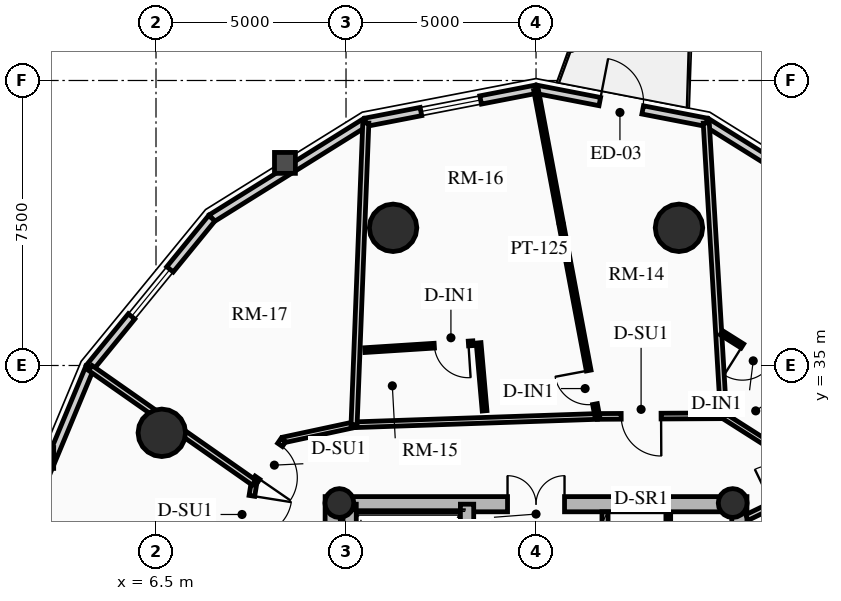
"""IFC4 building model, lengths in metres.
Left out: names, types, materials, properties, quantities, classifications, styles, units other than length and angle.
Written with IfcOpenShell. Run it as: python <this file> out.ifc"""

import sys

from ifc_helpers import new_model, si_unit, direction, frame, frame_2d, origin, origin_2d, place, context, subcontext, project, spatial, rectangle, circle, hollow_circle, extrude, source, transform, mapped, element, fill, save


model = new_model("IFC4")
c1 = context("Model", 3, precision=1e-05, world=origin(), true_north=direction((0.0, 1.0)))
c2 = subcontext(c1, "Body", "Model", "MODEL_VIEW")
j1 = project(units=[si_unit("LENGTHUNIT", "METRE"), si_unit("PLANEANGLEUNIT", "RADIAN")], contexts=[c1])
p1 = place(None, origin())
s1 = spatial("IfcSite", under=j1, at=p1, CompositionType="ELEMENT")
p2 = place(p1, origin())
s2 = spatial("IfcBuilding", under=s1, at=p2, CompositionType="ELEMENT")
p3 = place(p2, frame((0.0, 0.0, 154.51)))
s3 = spatial("IfcBuildingStorey", under=s2, at=p3, CompositionType="ELEMENT", Elevation=154.51)
for number, where, z_axis, x_axis in (
    (1, (11.15, 17.45, 0.0), (0.0, 0.0, 1.0), (0.0, 1.0, 0.0)),
    (2, (21.85, 17.45, 0.0), (0.0, 0.0, 1.0), (0.0, 1.0, 0.0)),
):
    element("IfcWall", number, at=place(p3, frame(where, z_axis=z_axis, x_axis=x_axis)), inside=s3, PredefinedType="SHEAR", context=c2, shape_type="SweptSolid", body=[
        extrude(rectangle(XDim=14.1, YDim=0.4, at=frame_2d((7.05, 0.0))), origin(), (0.0, 0.0, 1.0), 2.91),
    ])
p4 = place(p3, frame((11.15, 31.35, 0.0), z_axis=(0.0, 0.0, 1.0), x_axis=(1.0, 0.0, 0.0)))
e3 = element("IfcWall", 3, at=p4, inside=s3, PredefinedType="SHEAR", context=c2, shape_type="SweptSolid", body=[
    extrude(rectangle(XDim=10.7, YDim=0.4, at=frame_2d((5.35, 0.0))), origin(), (0.0, 0.0, 1.0), 2.91),
])
m1 = source(origin(), c2, "Body", "SweptSolid", [
    extrude(rectangle(XDim=1.5, YDim=2.02, at=frame_2d((0.75, 1.01))), frame((0.0, 0.21, 0.0), z_axis=(0.0, -1.0, 0.0), x_axis=(1.0, 0.0, 0.0)), (0.0, 0.0, 1.0), 0.42),
])
p5 = place(p4, frame((4.6, 0.0, 0.0)))
e4 = element("IfcOpeningElement", 4, at=p5, cuts=e3, PredefinedType="OPENING", context=c2, shape_type="MappedRepresentation", body=[
    mapped(m1, transform((0.0, 0.0, 0.0), x_axis=(1.0, 0.0, 0.0), y_axis=(0.0, 1.0, 0.0), z_axis=(0.0, 0.0, 1.0), scale=1.0)),
])
p6 = place(p3, frame((14.685, 17.65, 0.0), z_axis=(0.0, 0.0, 1.0), x_axis=(0.0, 1.0, 0.0)))
e5 = element("IfcWall", 5, at=p6, inside=s3, PredefinedType="SHEAR", context=c2, shape_type="SweptSolid", body=[
    extrude(rectangle(XDim=13.7, YDim=0.35, at=frame_2d((6.85, 0.0))), origin(), (0.0, 0.0, 1.0), 2.91),
])
m2 = source(origin(), c2, "Body", "SweptSolid", [
    extrude(rectangle(XDim=1.1, YDim=2.015, at=frame_2d((0.55, 1.007))), frame((0.0, 0.185, 0.0), z_axis=(0.0, -1.0, 0.0), x_axis=(1.0, 0.0, 0.0)), (0.0, 0.0, 1.0), 0.37),
])
p7 = place(p6, frame((4.85, 0.0, 0.0)))
e6 = element("IfcOpeningElement", 6, at=p7, cuts=e5, PredefinedType="OPENING", context=c2, shape_type="MappedRepresentation", body=[
    mapped(m2, transform((0.0, 0.0, 0.0), x_axis=(1.0, 0.0, 0.0), y_axis=(0.0, 1.0, 0.0), z_axis=(0.0, 0.0, 1.0), scale=1.0)),
])
p8 = place(p6, frame((0.625, 0.0, 0.0)))
e7 = element("IfcOpeningElement", 7, at=p8, cuts=e5, PredefinedType="OPENING", context=c2, shape_type="MappedRepresentation", body=[
    mapped(m2, transform((0.0, 0.0, 0.0), x_axis=(1.0, 0.0, 0.0), y_axis=(0.0, 1.0, 0.0), z_axis=(0.0, 0.0, 1.0), scale=1.0)),
])
p9 = place(p6, frame((2.625, 0.0, 0.0)))
e8 = element("IfcOpeningElement", 8, at=p9, cuts=e5, PredefinedType="OPENING", context=c2, shape_type="MappedRepresentation", body=[
    mapped(m2, transform((0.0, 0.0, 0.0), x_axis=(1.0, 0.0, 0.0), y_axis=(0.0, 1.0, 0.0), z_axis=(0.0, 0.0, 1.0), scale=1.0)),
])
m3 = source(origin(), c2, "Body", "SweptSolid", [
    extrude(rectangle(XDim=1.15, YDim=2.02, at=frame_2d((0.575, 1.01))), frame((0.0, 0.185, 0.0), z_axis=(0.0, -1.0, 0.0), x_axis=(1.0, 0.0, 0.0)), (0.0, 0.0, 1.0), 0.37),
])
p10 = place(p6, frame((7.27, 0.0, 0.0)))
e9 = element("IfcOpeningElement", 9, at=p10, cuts=e5, PredefinedType="OPENING", context=c2, shape_type="MappedRepresentation", body=[
    mapped(m3, transform((0.0, 0.0, 0.0), x_axis=(1.0, 0.0, 0.0), y_axis=(0.0, 1.0, 0.0), z_axis=(0.0, 0.0, 1.0), scale=1.0)),
])
p11 = place(p3, frame((11.595, 24.655, 0.0), z_axis=(0.0, 0.0, 1.0), x_axis=(0.0, 1.0, 0.0)))
e10 = element("IfcWall", 10, at=p11, inside=s3, PredefinedType="SHEAR", context=c2, shape_type="SweptSolid", body=[
    extrude(rectangle(XDim=6.695, YDim=0.35, at=frame_2d((3.348, 0.0))), origin(), (0.0, 0.0, 1.0), 2.91),
])
for number, where, z_axis, x_axis in (
    (11, (11.325, 31.38, 0.0), (0.0, 0.0, 1.0), (1.0, 0.0, 0.0)),
    (12, (21.675, 31.38, 0.0), (0.0, 0.0, 1.0), (1.0, 0.0, 0.0)),
):
    element("IfcColumn", number, at=place(p3, frame(where, z_axis=z_axis, x_axis=x_axis)), inside=s3, PredefinedType="COLUMN", context=c2, shape_type="SweptSolid", body=[
        extrude(hollow_circle(Radius=0.38, WallThickness=0.032, at=origin_2d()), origin(), (0.0, 0.0, 1.0), 2.91),
    ])
for number, where, z_axis, x_axis in (
    (13, (20.261, 38.623, 0.0), (0.0, 0.0, 1.0), (1.0, 0.0, 0.0)),
    (14, (12.739, 38.623, 0.0), (0.0, 0.0, 1.0), (1.0, 0.0, 0.0)),
    (15, (6.653, 33.229, 0.0), (0.0, 0.0, 1.0), (1.0, 0.0, 0.0)),
):
    element("IfcColumn", number, at=place(p3, frame(where, z_axis=z_axis, x_axis=x_axis)), inside=s3, PredefinedType="USERDEFINED", context=c2, shape_type="SweptSolid", body=[
        extrude(circle(Radius=0.625, at=origin_2d()), origin(), (0.0, 0.0, 1.0), 2.91),
    ])
p12 = place(p3, frame((20.985, 41.4, 0.0), z_axis=(0.0, 0.0, 1.0), x_axis=(0.848452391194, -0.529271707044, 0.0)))
e16 = element("IfcWall", 16, at=p12, inside=s3, PredefinedType="SOLIDWALL", context=c2, shape_type="SweptSolid", body=[
    extrude(rectangle(XDim=4.769, YDim=0.22, at=frame_2d((2.385, 0.0))), origin(), (0.0, 0.0, 1.0), 2.245),
])
p13 = place(p3, frame((16.5, 42.27, 0.0), z_axis=(0.0, 0.0, 1.0), x_axis=(0.981718699963, -0.190337579429, 0.0)))
e17 = element("IfcWall", 17, at=p13, inside=s3, PredefinedType="SOLIDWALL", context=c2, shape_type="SweptSolid", body=[
    extrude(rectangle(XDim=4.569, YDim=0.22, at=frame_2d((2.284, 0.0))), origin(), (0.0, 0.0, 1.0), 2.245),
])
m4 = source(origin(), c2, "Body", "SweptSolid", [
    extrude(rectangle(XDim=1.15, YDim=2.005, at=frame_2d((0.575, 1.002))), frame((0.0, 0.12, 0.0), z_axis=(0.0, -1.0, 0.0), x_axis=(1.0, 0.0, 0.0)), (0.0, 0.0, 1.0), 0.24),
])
p14 = place(p13, frame((1.709, 0.0, 0.0)))
e18 = element("IfcOpeningElement", 18, at=p14, cuts=e17, PredefinedType="OPENING", context=c2, shape_type="MappedRepresentation", body=[
    mapped(m4, transform((0.0, 0.0, 0.0), x_axis=(1.0, 0.0, 0.0), y_axis=(0.0, 1.0, 0.0), z_axis=(0.0, 0.0, 1.0), scale=1.0)),
])
p15 = place(p3, frame((12.015, 41.4, 0.0), z_axis=(0.0, 0.0, 1.0), x_axis=(0.981718699963, 0.190337579429, 0.0)))
e19 = element("IfcWall", 19, at=p15, inside=s3, PredefinedType="SOLIDWALL", context=c2, shape_type="SweptSolid", body=[
    extrude(rectangle(XDim=4.569, YDim=0.22, at=frame_2d((2.284, 0.0))), origin(), (0.0, 0.0, 1.0), 2.245),
])
m5 = source(origin(), c2, "Body", "SweptSolid", [
    extrude(rectangle(XDim=1.6, YDim=1.3, at=frame_2d((0.8, 0.65))), frame((0.0, 0.12, 0.0), z_axis=(0.0, -1.0, 0.0), x_axis=(1.0, 0.0, 0.0)), (0.0, 0.0, 1.0), 0.24),
])
p16 = place(p15, frame((1.484, 0.0, 0.65)))
e20 = element("IfcOpeningElement", 20, at=p16, cuts=e19, PredefinedType="OPENING", context=c2, shape_type="MappedRepresentation", body=[
    mapped(m5, transform((0.0, 0.0, 0.0), x_axis=(1.0, 0.0, 0.0), y_axis=(0.0, 1.0, 0.0), z_axis=(0.0, 0.0, 1.0), scale=1.0)),
])
p17 = place(p3, frame((7.968, 38.876, 0.0), z_axis=(0.0, 0.0, 1.0), x_axis=(0.848452391194, 0.529271707044, 0.0)))
e21 = element("IfcWall", 21, at=p17, inside=s3, PredefinedType="SOLIDWALL", context=c2, shape_type="SweptSolid", body=[
    extrude(rectangle(XDim=4.769, YDim=0.22, at=frame_2d((2.385, 0.0))), origin(), (0.0, 0.0, 1.0), 2.245),
])
p18 = place(p3, frame((4.757, 34.945, 0.0), z_axis=(0.0, 0.0, 1.0), x_axis=(0.632598524901, 0.774479894053, 0.0)))
e22 = element("IfcWall", 22, at=p18, inside=s3, PredefinedType="SOLIDWALL", context=c2, shape_type="SweptSolid", body=[
    extrude(rectangle(XDim=5.076, YDim=0.22, at=frame_2d((2.538, 0.0))), origin(), (0.0, 0.0, 1.0), 2.245),
])
p19 = place(p18, frame((1.738, 0.0, 0.65)))
e23 = element("IfcOpeningElement", 23, at=p19, cuts=e22, PredefinedType="OPENING", context=c2, shape_type="MappedRepresentation", body=[
    mapped(m5, transform((0.0, 0.0, 0.0), x_axis=(1.0, 0.0, 0.0), y_axis=(0.0, 1.0, 0.0), z_axis=(0.0, 0.0, 1.0), scale=1.0)),
])
p20 = place(p3, frame((2.695, 29.991, 0.0), z_axis=(0.0, 0.0, 1.0), x_axis=(0.384259959969, 0.923224936386, 0.0)))
e24 = element("IfcWall", 24, at=p20, inside=s3, PredefinedType="SOLIDWALL", context=c2, shape_type="SweptSolid", body=[
    extrude(rectangle(XDim=5.365, YDim=0.22, at=frame_2d((2.683, 0.0))), origin(), (0.0, 0.0, 1.0), 2.245),
])
p21 = place(p3, frame((18.315, 27.25, 0.0), z_axis=(0.0, 0.0, 1.0), x_axis=(0.0, 1.0, 0.0)))
e25 = element("IfcWall", 25, at=p21, inside=s3, PredefinedType="PARTITIONING", context=c2, shape_type="SweptSolid", body=[
    extrude(rectangle(XDim=3.9, YDim=0.16, at=frame_2d((1.95, 0.0))), origin(), (0.0, 0.0, 1.0), 2.675),
])
m6 = source(origin(), c2, "Body", "SweptSolid", [
    extrude(rectangle(XDim=0.9, YDim=2.005, at=frame_2d((0.45, 1.002))), frame((0.0, 0.09, 0.0), z_axis=(0.0, -1.0, 0.0), x_axis=(1.0, 0.0, 0.0)), (0.0, 0.0, 1.0), 0.18),
])
p22 = place(p21, frame((2.2, 0.0, 0.0)))
e26 = element("IfcOpeningElement", 26, at=p22, cuts=e25, PredefinedType="OPENING", context=c2, shape_type="MappedRepresentation", body=[
    mapped(m6, transform((0.0, 0.0, 0.0), x_axis=(1.0, 0.0, 0.0), y_axis=(0.0, 1.0, 0.0), z_axis=(0.0, 0.0, 1.0), scale=1.0)),
])
p23 = place(p3, frame((19.98, 27.3, 0.0), z_axis=(0.0, 0.0, 1.0), x_axis=(0.0, 1.0, 0.0)))
e27 = element("IfcWall", 27, at=p23, inside=s3, PredefinedType="PARTITIONING", context=c2, shape_type="SweptSolid", body=[
    extrude(rectangle(XDim=3.82, YDim=0.125, at=frame_2d((1.91, 0.0))), origin(), (0.0, 0.0, 1.0), 2.675),
])
m7 = source(origin(), c2, "Body", "SweptSolid", [
    extrude(rectangle(XDim=0.9, YDim=2.005, at=frame_2d((0.45, 1.002))), frame((0.0, 0.073, 0.0), z_axis=(0.0, -1.0, 0.0), x_axis=(1.0, 0.0, 0.0)), (0.0, 0.0, 1.0), 0.145),
])
p24 = place(p23, frame((1.45, 0.0, 0.0)))
e28 = element("IfcOpeningElement", 28, at=p24, cuts=e27, PredefinedType="OPENING", context=c2, shape_type="MappedRepresentation", body=[
    mapped(m7, transform((0.0, 0.0, 0.0), x_axis=(1.0, 0.0, 0.0), y_axis=(0.0, 1.0, 0.0), z_axis=(0.0, 0.0, 1.0), scale=1.0)),
])
p25 = place(p3, frame((22.756, 32.836, 0.0), z_axis=(0.0, 0.0, 1.0), x_axis=(-0.843828401801, 0.536613108593, 0.0)))
e29 = element("IfcWall", 29, at=p25, inside=s3, PredefinedType="PARTITIONING", context=c2, shape_type="SweptSolid", body=[
    extrude(rectangle(XDim=1.565, YDim=0.15, at=frame_2d((0.783, 0.0))), origin(), (0.0, 0.0, 1.0), 2.245),
])
p26 = place(p3, frame((21.435, 33.677, 0.0), z_axis=(0.0, 0.0, 1.0), x_axis=(-0.999986775557, -0.005142831114, 0.0)))
e30 = element("IfcWall", 30, at=p26, inside=s3, PredefinedType="PARTITIONING", context=c2, shape_type="SweptSolid", body=[
    extrude(rectangle(XDim=3.323, YDim=0.15, at=frame_2d((1.662, 0.0))), origin(), (0.0, 0.0, 1.0), 2.245),
])
m8 = source(origin(), c2, "Body", "SweptSolid", [
    extrude(rectangle(XDim=1.05, YDim=2.015, at=frame_2d((0.525, 1.007))), frame((0.0, 0.085, 0.0), z_axis=(0.0, -1.0, 0.0), x_axis=(1.0, 0.0, 0.0)), (0.0, 0.0, 1.0), 0.17),
])
p27 = place(p26, frame((1.645, 0.0, 0.0)))
e31 = element("IfcOpeningElement", 31, at=p27, cuts=e30, PredefinedType="OPENING", context=c2, shape_type="MappedRepresentation", body=[
    mapped(m8, transform((0.0, 0.0, 0.0), x_axis=(1.0, 0.0, 0.0), y_axis=(0.0, 1.0, 0.0), z_axis=(0.0, 0.0, 1.0), scale=1.0)),
])
p28 = place(p3, frame((18.112, 33.659, 0.0), z_axis=(0.0, 0.0, 1.0), x_axis=(-0.999413895918, -0.034232508622, 0.0)))
e32 = element("IfcWall", 32, at=p28, inside=s3, PredefinedType="PARTITIONING", context=c2, shape_type="SweptSolid", body=[
    extrude(rectangle(XDim=6.404, YDim=0.15, at=frame_2d((3.202, 0.0))), origin(), (0.0, 0.0, 1.0), 2.245),
])
p29 = place(p3, frame((11.712, 33.44, 0.0), z_axis=(0.0, 0.0, 1.0), x_axis=(-0.977753514213, -0.209757158265, 0.0)))
e33 = element("IfcWall", 33, at=p29, inside=s3, PredefinedType="PARTITIONING", context=c2, shape_type="SweptSolid", body=[
    extrude(rectangle(XDim=1.901, YDim=0.15, at=frame_2d((0.95, 0.0))), origin(), (0.0, 0.0, 1.0), 2.245),
])
p30 = place(p3, frame((9.853, 33.042, 0.0), z_axis=(0.0, 0.0, 1.0), x_axis=(-0.567189283521, -0.823587467522, 0.0)))
e34 = element("IfcWall", 34, at=p30, inside=s3, PredefinedType="PARTITIONING", context=c2, shape_type="SweptSolid", body=[
    extrude(rectangle(XDim=1.365, YDim=0.15, at=frame_2d((0.682, 0.0))), origin(), (0.0, 0.0, 1.0), 2.245),
])
p31 = place(p30, frame((0.157, 0.0, 0.0)))
e35 = element("IfcOpeningElement", 35, at=p31, cuts=e34, PredefinedType="OPENING", context=c2, shape_type="MappedRepresentation", body=[
    mapped(m8, transform((0.0, 0.0, 0.0), x_axis=(1.0, 0.0, 0.0), y_axis=(0.0, 1.0, 0.0), z_axis=(0.0, 0.0, 1.0), scale=1.0)),
])
p32 = place(p3, frame((9.079, 31.918, 0.0), z_axis=(0.0, 0.0, 1.0), x_axis=(-0.15742775293, -0.987530507178, 0.0)))
e36 = element("IfcWall", 36, at=p32, inside=s3, PredefinedType="PARTITIONING", context=c2, shape_type="SweptSolid", body=[
    extrude(rectangle(XDim=1.523, YDim=0.15, at=frame_2d((0.761, 0.0))), origin(), (0.0, 0.0, 1.0), 2.245),
])
p33 = place(p32, frame((0.353, 0.0, 0.0)))
e37 = element("IfcOpeningElement", 37, at=p33, cuts=e36, PredefinedType="OPENING", context=c2, shape_type="MappedRepresentation", body=[
    mapped(m8, transform((0.0, 0.0, 0.0), x_axis=(1.0, 0.0, 0.0), y_axis=(0.0, 1.0, 0.0), z_axis=(0.0, 0.0, 1.0), scale=1.0)),
])
p34 = place(p3, frame((21.435, 33.677, 0.0), z_axis=(0.0, 0.0, 1.0), x_axis=(-0.059087305226, 0.99825281886, 0.0)))
e38 = element("IfcWall", 38, at=p34, inside=s3, PredefinedType="PARTITIONING", context=c2, shape_type="SweptSolid", body=[
    extrude(rectangle(XDim=7.718, YDim=0.16, at=frame_2d((3.859, 0.0))), origin(), (0.0, 0.0, 1.0), 2.245),
])
p35 = place(p3, frame((11.712, 33.44, 0.0), z_axis=(0.0, 0.0, 1.0), x_axis=(0.038892064024, 0.999243417469, 0.0)))
e39 = element("IfcWall", 39, at=p35, inside=s3, PredefinedType="PARTITIONING", context=c2, shape_type="SweptSolid", body=[
    extrude(rectangle(XDim=7.947, YDim=0.16, at=frame_2d((3.974, 0.0))), origin(), (0.0, 0.0, 1.0), 2.245),
])
p36 = place(p3, frame((9.079, 31.918, 0.0), z_axis=(0.0, 0.0, 1.0), x_axis=(-0.819135909075, 0.573599479135, 0.0)))
e40 = element("IfcWall", 40, at=p36, inside=s3, PredefinedType="PARTITIONING", context=c2, shape_type="SweptSolid", body=[
    extrude(rectangle(XDim=5.257, YDim=0.16, at=frame_2d((2.628, 0.0))), origin(), (0.0, 0.0, 1.0), 2.245),
])
p37 = place(p3, frame((22.05, 31.0, 0.0), z_axis=(0.0, 0.0, 1.0), x_axis=(0.900241516545, 0.435390872537, 0.0)))
e41 = element("IfcWall", 41, at=p37, inside=s3, PredefinedType="PARTITIONING", context=c2, shape_type="SweptSolid", body=[
    extrude(rectangle(XDim=1.989, YDim=0.16, at=frame_2d((0.995, 0.0))), origin(), (0.0, 0.0, 1.0), 2.245),
])
m9 = source(origin(), c2, "Body", "SweptSolid", [
    extrude(rectangle(XDim=1.05, YDim=2.015, at=frame_2d((0.525, 1.007))), frame((0.0, 0.09, 0.0), z_axis=(0.0, -1.0, 0.0), x_axis=(1.0, 0.0, 0.0)), (0.0, 0.0, 1.0), 0.18),
])
p38 = place(p37, frame((0.739, 0.0, 0.0)))
e42 = element("IfcOpeningElement", 42, at=p38, cuts=e41, PredefinedType="OPENING", context=c2, shape_type="MappedRepresentation", body=[
    mapped(m9, transform((0.0, 0.0, 0.0), x_axis=(1.0, 0.0, 0.0), y_axis=(0.0, 1.0, 0.0), z_axis=(0.0, 0.0, 1.0), scale=1.0)),
])
p39 = place(p3, frame((23.064, 34.801, 0.0), z_axis=(0.0, 0.0, 1.0), x_axis=(-0.846418905871, 0.532517638942, 0.0)))
e43 = element("IfcWall", 43, at=p39, inside=s3, PredefinedType="PARTITIONING", context=c2, shape_type="SweptSolid", body=[
    extrude(rectangle(XDim=1.993, YDim=0.125, at=frame_2d((0.997, 0.0))), origin(), (0.0, 0.0, 1.0), 2.675),
])
p40 = place(p39, frame((0.44, 0.0, 0.0)))
e44 = element("IfcOpeningElement", 44, at=p40, cuts=e43, PredefinedType="OPENING", context=c2, shape_type="MappedRepresentation", body=[
    mapped(m7, transform((0.0, 0.0, 0.0), x_axis=(1.0, 0.0, 0.0), y_axis=(0.0, 1.0, 0.0), z_axis=(0.0, 0.0, 1.0), scale=1.0)),
])
p41 = place(p3, frame((18.112, 33.659, 0.0), z_axis=(0.0, 0.0, 1.0), x_axis=(-0.18446223694, 0.982839601941, 0.0)))
e45 = element("IfcWall", 45, at=p41, inside=s3, PredefinedType="PARTITIONING", context=c2, shape_type="SweptSolid", body=[
    extrude(rectangle(XDim=8.74, YDim=0.125, at=frame_2d((4.37, 0.0))), origin(), (0.0, 0.0, 1.0), 2.245),
])
p42 = place(p41, frame((0.33, 0.0, 0.0)))
e46 = element("IfcOpeningElement", 46, at=p42, cuts=e45, PredefinedType="OPENING", context=c2, shape_type="MappedRepresentation", body=[
    mapped(m7, transform((0.0, 0.0, 0.0), x_axis=(1.0, 0.0, 0.0), y_axis=(0.0, 1.0, 0.0), z_axis=(0.0, 0.0, 1.0), scale=1.0)),
])
p43 = place(p3, frame((15.146, 33.807, 0.0), z_axis=(0.0, 0.0, 1.0), x_axis=(-0.087433462003, 0.996170361797, 0.0)))
e47 = element("IfcWall", 47, at=p43, inside=s3, PredefinedType="PARTITIONING", context=c2, shape_type="SweptSolid", body=[
    extrude(rectangle(XDim=1.795, YDim=0.125, at=frame_2d((0.898, 0.0))), origin(), (0.0, 0.0, 1.0), 2.675),
])
p44 = place(p3, frame((14.841, 35.586, 0.0), z_axis=(0.0, 0.0, 1.0), x_axis=(-0.997963636416, -0.063785424599, 0.0)))
e48 = element("IfcWall", 48, at=p44, inside=s3, PredefinedType="PARTITIONING", context=c2, shape_type="SweptSolid", body=[
    extrude(rectangle(XDim=2.852, YDim=0.125, at=frame_2d((1.426, 0.0))), origin(), (0.0, 0.0, 1.0), 2.245),
])
p45 = place(p44, frame((0.12, 0.0, 0.0)))
e49 = element("IfcOpeningElement", 49, at=p45, cuts=e48, PredefinedType="OPENING", context=c2, shape_type="MappedRepresentation", body=[
    mapped(m7, transform((0.0, 0.0, 0.0), x_axis=(1.0, 0.0, 0.0), y_axis=(0.0, 1.0, 0.0), z_axis=(0.0, 0.0, 1.0), scale=1.0)),
])
m10 = source(origin(), c2, "Body", "SweptSolid", [
    extrude(rectangle(XDim=1.15, YDim=2.005, at=frame_2d((0.575, 1.002))), frame((0.0, 0.025, 0.0), z_axis=(0.0, -1.0, 0.0), x_axis=(1.0, 0.0, 0.0)), (0.0, 0.0, 1.0), 0.05),
])
p46 = place(p14, origin())
e50 = element("IfcDoor", 50, at=p46, inside=s3, OperationType="SINGLE_SWING_LEFT", PredefinedType="DOOR", context=c2, shape_type="MappedRepresentation", body=[
    mapped(m10, transform((0.0, 0.0, 0.0), x_axis=(1.0, 0.0, 0.0), y_axis=(0.0, 1.0, 0.0), z_axis=(0.0, 0.0, 1.0), scale=1.0)),
])
fill(e18, e50)
m11 = source(origin(), c2, "Body", "SweptSolid", [
    extrude(rectangle(XDim=1.6, YDim=1.3, at=frame_2d((0.8, 0.65))), frame((0.0, 0.03, 0.0), z_axis=(0.0, -1.0, 0.0), x_axis=(1.0, 0.0, 0.0)), (0.0, 0.0, 1.0), 0.06),
])
p47 = place(p16, origin())
e51 = element("IfcWindow", 51, at=p47, inside=s3, PartitioningType="SINGLE_PANEL", PredefinedType="WINDOW", context=c2, shape_type="MappedRepresentation", body=[
    mapped(m11, transform((0.0, 0.0, 0.0), x_axis=(1.0, 0.0, 0.0), y_axis=(0.0, 1.0, 0.0), z_axis=(0.0, 0.0, 1.0), scale=1.0)),
])
fill(e20, e51)
p48 = place(p19, origin())
e52 = element("IfcWindow", 52, at=p48, inside=s3, PartitioningType="SINGLE_PANEL", PredefinedType="WINDOW", context=c2, shape_type="MappedRepresentation", body=[
    mapped(m11, transform((0.0, 0.0, 0.0), x_axis=(1.0, 0.0, 0.0), y_axis=(0.0, 1.0, 0.0), z_axis=(0.0, 0.0, 1.0), scale=1.0)),
])
fill(e23, e52)
m12 = source(origin(), c2, "Body", "SweptSolid", [
    extrude(rectangle(XDim=1.5, YDim=2.02, at=frame_2d((0.75, 1.01))), frame((0.0, 0.025, 0.0), z_axis=(0.0, -1.0, 0.0), x_axis=(1.0, 0.0, 0.0)), (0.0, 0.0, 1.0), 0.05),
])
p49 = place(p5, origin())
e53 = element("IfcDoor", 53, at=p49, inside=s3, OperationType="DOUBLE_DOOR_SINGLE_SWING", PredefinedType="DOOR", context=c2, shape_type="MappedRepresentation", body=[
    mapped(m12, transform((0.0, 0.0, 0.0), x_axis=(1.0, 0.0, 0.0), y_axis=(0.0, 1.0, 0.0), z_axis=(0.0, 0.0, 1.0), scale=1.0)),
])
fill(e4, e53)
m13 = source(origin(), c2, "Body", "SweptSolid", [
    extrude(rectangle(XDim=0.9, YDim=2.005, at=frame_2d((0.45, 1.002))), frame((0.0, 0.025, 0.0), z_axis=(0.0, -1.0, 0.0), x_axis=(1.0, 0.0, 0.0)), (0.0, 0.0, 1.0), 0.05),
])
p50 = place(p40, origin())
e54 = element("IfcDoor", 54, at=p50, inside=s3, OperationType="SINGLE_SWING_RIGHT", PredefinedType="DOOR", context=c2, shape_type="MappedRepresentation", body=[
    mapped(m13, transform((0.0, 0.0, 0.0), x_axis=(1.0, 0.0, 0.0), y_axis=(0.0, 1.0, 0.0), z_axis=(0.0, 0.0, 1.0), scale=1.0)),
])
fill(e44, e54)
m14 = source(origin(), c2, "Body", "SweptSolid", [
    extrude(rectangle(XDim=1.05, YDim=2.015, at=frame_2d((0.525, 1.007))), frame((0.0, 0.025, 0.0), z_axis=(0.0, -1.0, 0.0), x_axis=(1.0, 0.0, 0.0)), (0.0, 0.0, 1.0), 0.05),
])
p51 = place(p27, origin())
e55 = element("IfcDoor", 55, at=p51, inside=s3, OperationType="SINGLE_SWING_LEFT", PredefinedType="DOOR", context=c2, shape_type="MappedRepresentation", body=[
    mapped(m14, transform((0.0, 0.0, 0.0), x_axis=(1.0, 0.0, 0.0), y_axis=(0.0, 1.0, 0.0), z_axis=(0.0, 0.0, 1.0), scale=1.0)),
])
fill(e31, e55)
p52 = place(p42, origin())
e56 = element("IfcDoor", 56, at=p52, inside=s3, OperationType="SINGLE_SWING_RIGHT", PredefinedType="DOOR", context=c2, shape_type="MappedRepresentation", body=[
    mapped(m13, transform((0.0, 0.0, 0.0), x_axis=(1.0, 0.0, 0.0), y_axis=(0.0, 1.0, 0.0), z_axis=(0.0, 0.0, 1.0), scale=1.0)),
])
fill(e46, e56)
p53 = place(p45, origin())
e57 = element("IfcDoor", 57, at=p53, inside=s3, OperationType="SINGLE_SWING_LEFT", PredefinedType="DOOR", context=c2, shape_type="MappedRepresentation", body=[
    mapped(m13, transform((0.0, 0.0, 0.0), x_axis=(1.0, 0.0, 0.0), y_axis=(0.0, 1.0, 0.0), z_axis=(0.0, 0.0, 1.0), scale=1.0)),
])
fill(e49, e57)
p54 = place(p31, origin())
e58 = element("IfcDoor", 58, at=p54, inside=s3, OperationType="SINGLE_SWING_RIGHT", PredefinedType="DOOR", context=c2, shape_type="MappedRepresentation", body=[
    mapped(m14, transform((0.0, 0.0, 0.0), x_axis=(1.0, 0.0, 0.0), y_axis=(0.0, 1.0, 0.0), z_axis=(0.0, 0.0, 1.0), scale=1.0)),
])
fill(e35, e58)
p55 = place(p33, origin())
e59 = element("IfcDoor", 59, at=p55, inside=s3, OperationType="SINGLE_SWING_LEFT", PredefinedType="DOOR", context=c2, shape_type="MappedRepresentation", body=[
    mapped(m14, transform((0.0, 0.0, 0.0), x_axis=(1.0, 0.0, 0.0), y_axis=(0.0, 1.0, 0.0), z_axis=(0.0, 0.0, 1.0), scale=1.0)),
])
fill(e37, e59)
save(model, sys.argv[1])
